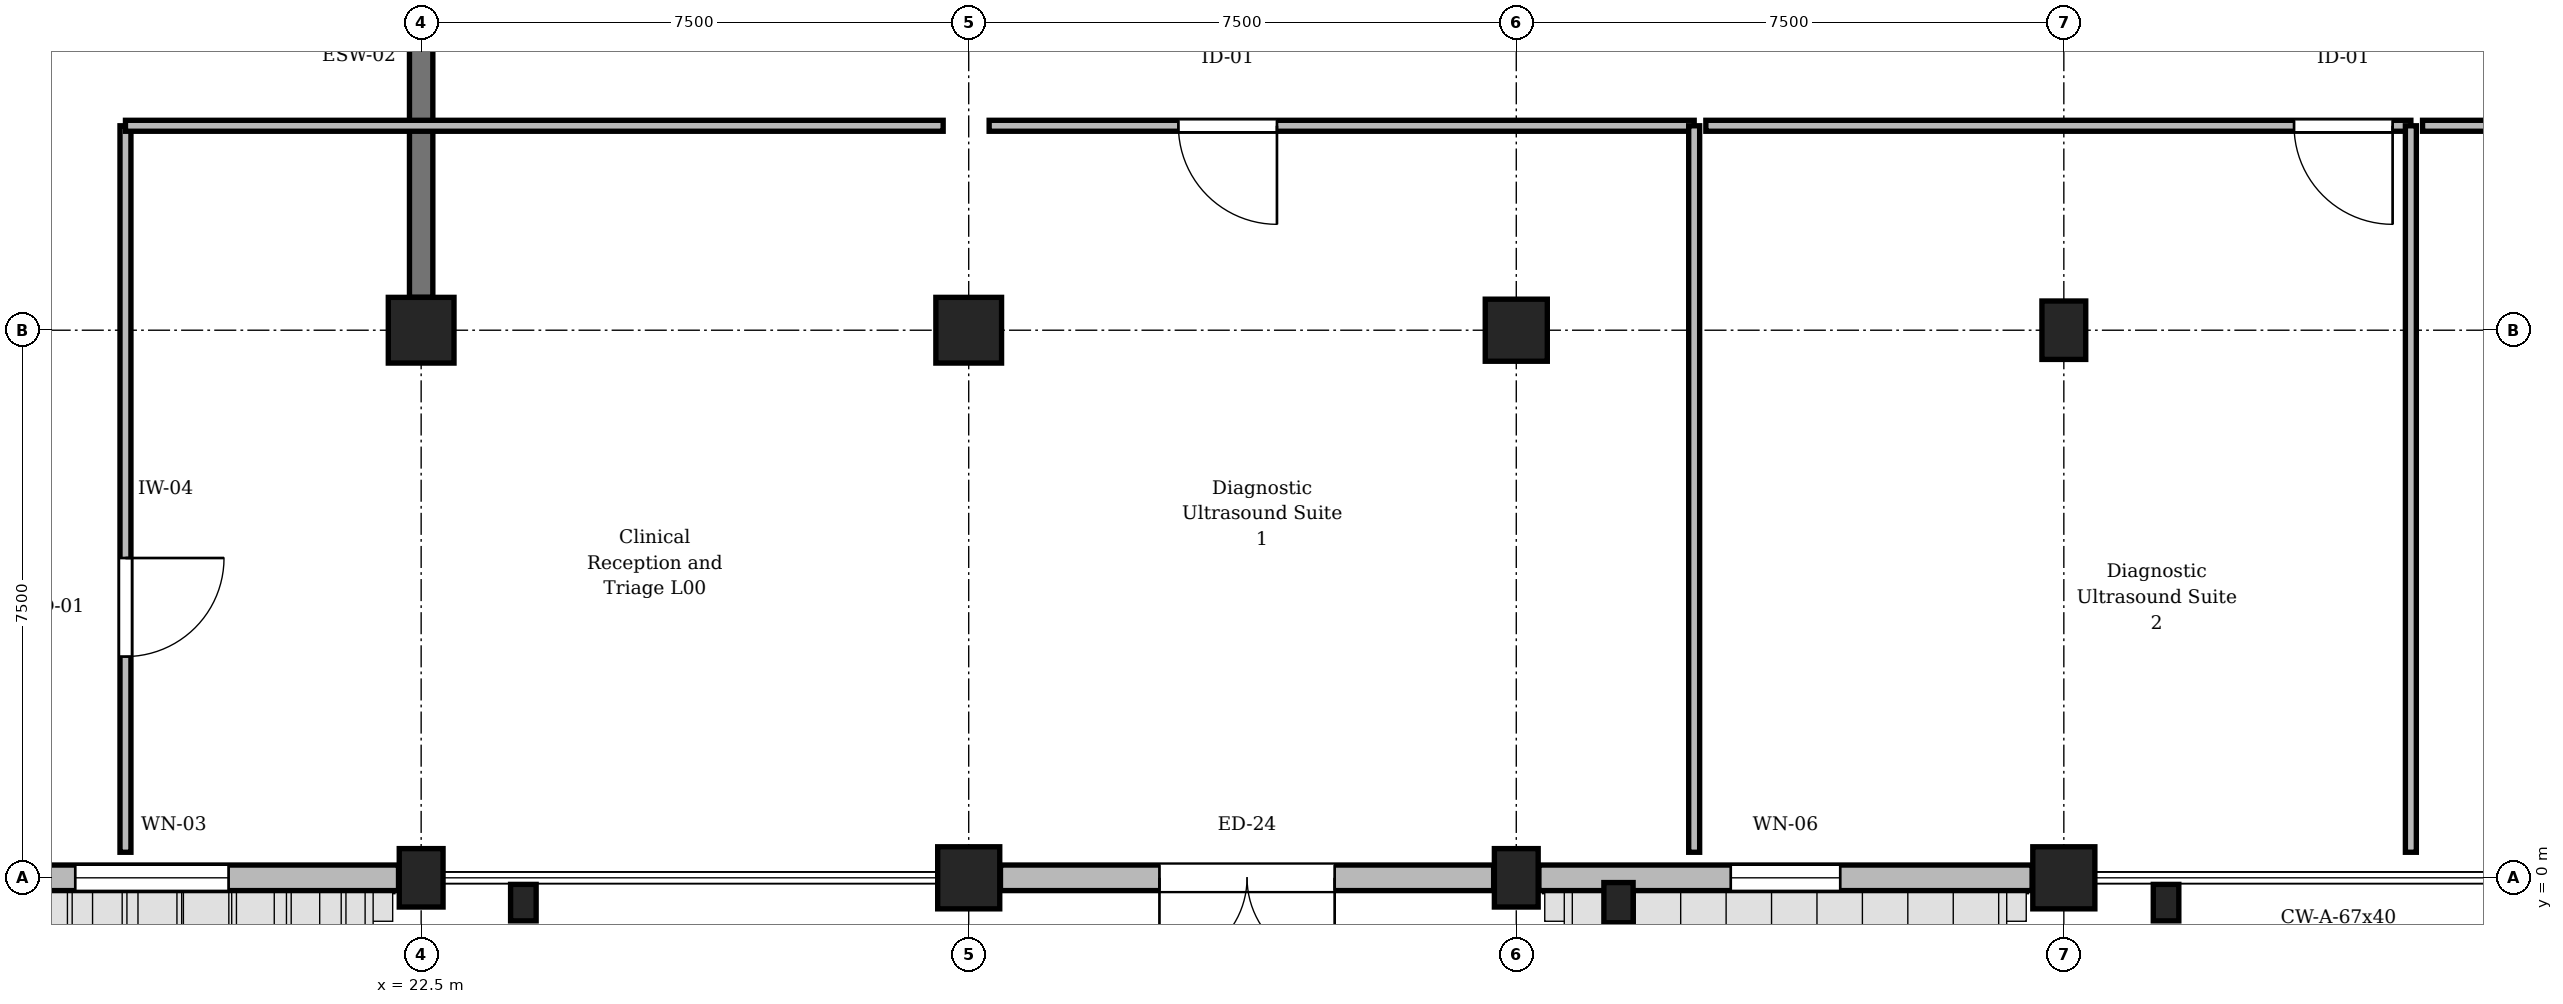
"""IFC4 building model, lengths in metres.
Left out: names, types, materials, properties, quantities, classifications, styles, units other than length and angle.
Written with IfcOpenShell. Run it as: python <this file> out.ifc"""

import sys

from ifc_helpers import new_model, si_unit, direction, frame, frame_2d, origin, origin_2d, place, context, subcontext, project, spatial, rectangle, extrude, element, fill, save


model = new_model("IFC4")
c1 = context("Model", 3, precision=1e-05, world=origin(), true_north=direction((0.0, 1.0)))
c2 = subcontext(c1, "Body", "Model", "MODEL_VIEW")
j1 = project(units=[si_unit("LENGTHUNIT", "METRE"), si_unit("PLANEANGLEUNIT", "RADIAN")], contexts=[c1])
p1 = place(None, origin())
s1 = spatial("IfcSite", under=j1, at=p1, CompositionType="ELEMENT")
p2 = place(p1, origin())
s2 = spatial("IfcBuilding", under=s1, at=p2, CompositionType="ELEMENT")
p3 = place(p2, origin())
s3 = spatial("IfcBuildingStorey", under=s2, at=p3, CompositionType="ELEMENT", Elevation=0.0)
p4 = place(p3, frame((22.5, 0.0, 0.0), z_axis=(0.0, 0.0, 1.0), x_axis=(1.0, 0.0, 0.0)))
e1 = element("IfcColumn", 1, at=p4, inside=s3, PredefinedType="COLUMN", context=c2, shape_type="SweptSolid", body=[
    extrude(rectangle(XDim=0.6, YDim=0.8, at=origin_2d()), origin(), (0.0, 0.0, 1.0), 4.8),
])
p5 = place(p3, frame((22.5, 7.5, 0.0), z_axis=(0.0, 0.0, 1.0), x_axis=(1.0, 0.0, 0.0)))
e2 = element("IfcColumn", 2, at=p5, inside=s3, PredefinedType="COLUMN", context=c2, shape_type="SweptSolid", body=[
    extrude(rectangle(XDim=0.9, YDim=0.9, at=origin_2d()), origin(), (0.0, 0.0, 1.0), 4.8),
])
p6 = place(p3, frame((30.0, 0.0, 0.0), z_axis=(0.0, 0.0, 1.0), x_axis=(1.0, 0.0, 0.0)))
e3 = element("IfcColumn", 3, at=p6, inside=s3, PredefinedType="COLUMN", context=c2, shape_type="SweptSolid", body=[
    extrude(rectangle(XDim=0.85, YDim=0.85, at=origin_2d()), origin(), (0.0, 0.0, 1.0), 4.8),
])
p7 = place(p3, frame((30.0, 7.5, 0.0), z_axis=(0.0, 0.0, 1.0), x_axis=(1.0, 0.0, 0.0)))
e4 = element("IfcColumn", 4, at=p7, inside=s3, PredefinedType="COLUMN", context=c2, shape_type="SweptSolid", body=[
    extrude(rectangle(XDim=0.9, YDim=0.9, at=origin_2d()), origin(), (0.0, 0.0, 1.0), 4.8),
])
p8 = place(p3, frame((37.5, 0.0, 0.0), z_axis=(0.0, 0.0, 1.0), x_axis=(1.0, 0.0, 0.0)))
e5 = element("IfcColumn", 5, at=p8, inside=s3, PredefinedType="COLUMN", context=c2, shape_type="SweptSolid", body=[
    extrude(rectangle(XDim=0.6, YDim=0.8, at=origin_2d()), origin(), (0.0, 0.0, 1.0), 4.8),
])
for number, where, z_axis, x_axis in (
    (6, (37.5, 7.5, 0.0), (0.0, 0.0, 1.0), (1.0, 0.0, 0.0)),
    (7, (45.0, 0.0, 0.0), (0.0, 0.0, 1.0), (1.0, 0.0, 0.0)),
):
    element("IfcColumn", number, at=place(p3, frame(where, z_axis=z_axis, x_axis=x_axis)), inside=s3, PredefinedType="COLUMN", context=c2, shape_type="SweptSolid", body=[
        extrude(rectangle(XDim=0.85, YDim=0.85, at=origin_2d()), origin(), (0.0, 0.0, 1.0), 4.8),
    ])
p9 = place(p3, frame((45.0, 7.5, 0.0), z_axis=(0.0, 0.0, 1.0), x_axis=(1.0, 0.0, 0.0)))
e8 = element("IfcColumn", 8, at=p9, inside=s3, PredefinedType="COLUMN", context=c2, shape_type="SweptSolid", body=[
    extrude(rectangle(XDim=0.6, YDim=0.8, at=origin_2d()), origin(), (0.0, 0.0, 1.0), 4.8),
])
p10 = place(p3, frame((23.9, -0.34, 0.0), z_axis=(0.0, 0.0, 1.0), x_axis=(1.0, 0.0, 0.0)))
e9 = element("IfcColumn", 9, at=p10, inside=s3, PredefinedType="PILASTER", context=c2, shape_type="SweptSolid", body=[
    extrude(rectangle(XDim=0.35, YDim=0.5, at=origin_2d()), origin(), (0.0, 0.0, 1.0), 4.1),
])
p11 = place(p3, frame((38.9, -0.34, 0.0), z_axis=(0.0, 0.0, 1.0), x_axis=(1.0, 0.0, 0.0)))
e10 = element("IfcColumn", 10, at=p11, inside=s3, PredefinedType="PILASTER", context=c2, shape_type="SweptSolid", body=[
    extrude(rectangle(XDim=0.4, YDim=0.55, at=origin_2d()), origin(), (0.0, 0.0, 1.0), 4.1),
])
p12 = place(p3, frame((46.4, -0.34, 0.0), z_axis=(0.0, 0.0, 1.0), x_axis=(1.0, 0.0, 0.0)))
e11 = element("IfcColumn", 11, at=p12, inside=s3, PredefinedType="PILASTER", context=c2, shape_type="SweptSolid", body=[
    extrude(rectangle(XDim=0.35, YDim=0.5, at=origin_2d()), origin(), (0.0, 0.0, 1.0), 4.1),
])
p13 = place(p3, frame((22.5, 7.95, 0.0), z_axis=(0.0, 0.0, 1.0), x_axis=(0.0, 1.0, 0.0)))
e12 = element("IfcWall", 12, at=p13, inside=s3, PredefinedType="SHEAR", context=c2, shape_type="SweptSolid", body=[
    extrude(rectangle(XDim=6.6, YDim=0.32, at=frame_2d((3.3, 0.0))), origin(), (0.0, 0.0, 1.0), 3.95),
])
p14 = place(p3, frame((22.19, 0.0, 0.0), z_axis=(0.0, 0.0, 1.0), x_axis=(-1.0, 0.0, 0.0)))
e13 = element("IfcWall", 13, at=p14, inside=s3, PredefinedType="STANDARD", context=c2, shape_type="SweptSolid", body=[
    extrude(rectangle(XDim=6.755, YDim=0.35, at=frame_2d((3.377, 0.0))), origin(), (0.0, 0.0, 1.0), 3.95),
])
p15 = place(p14, frame((2.327, 0.0, 0.9)))
e14 = element("IfcOpeningElement", 14, at=p15, cuts=e13, PredefinedType="OPENING", context=c2, shape_type="SweptSolid", body=[
    extrude(rectangle(XDim=2.1, YDim=2.4, at=frame_2d((1.05, 1.2))), frame((0.0, 0.185, 0.0), z_axis=(0.0, -1.0, 0.0), x_axis=(1.0, 0.0, 0.0)), (0.0, 0.0, 1.0), 0.37),
])
p16 = place(p3, frame((37.19, 0.0, 0.0), z_axis=(0.0, 0.0, 1.0), x_axis=(-1.0, 0.0, 0.0)))
e15 = element("IfcWall", 15, at=p16, inside=s3, PredefinedType="STANDARD", context=c2, shape_type="SweptSolid", body=[
    extrude(rectangle(XDim=6.755, YDim=0.35, at=frame_2d((3.377, 0.0))), origin(), (0.0, 0.0, 1.0), 3.95),
])
p17 = place(p16, frame((2.177, 0.0, 0.0)))
e16 = element("IfcOpeningElement", 16, at=p17, cuts=e15, PredefinedType="OPENING", context=c2, shape_type="SweptSolid", body=[
    extrude(rectangle(XDim=2.4, YDim=2.7, at=frame_2d((1.2, 1.35))), frame((0.0, 0.185, 0.0), z_axis=(0.0, -1.0, 0.0), x_axis=(1.0, 0.0, 0.0)), (0.0, 0.0, 1.0), 0.37),
])
p18 = place(p3, frame((44.565, 0.0, 0.0), z_axis=(0.0, 0.0, 1.0), x_axis=(-1.0, 0.0, 0.0)))
e17 = element("IfcWall", 17, at=p18, inside=s3, PredefinedType="STANDARD", context=c2, shape_type="SweptSolid", body=[
    extrude(rectangle(XDim=6.755, YDim=0.35, at=frame_2d((3.377, 0.0))), origin(), (0.0, 0.0, 1.0), 3.95),
])
p19 = place(p18, frame((2.627, 0.0, 0.9)))
e18 = element("IfcOpeningElement", 18, at=p19, cuts=e17, PredefinedType="OPENING", context=c2, shape_type="SweptSolid", body=[
    extrude(rectangle(XDim=1.5, YDim=2.1, at=frame_2d((0.75, 1.05))), frame((0.0, 0.185, 0.0), z_axis=(0.0, -1.0, 0.0), x_axis=(1.0, 0.0, 0.0)), (0.0, 0.0, 1.0), 0.37),
])
p20 = place(p3, frame((18.45, 10.3, 0.0), z_axis=(0.0, 0.0, 1.0), x_axis=(0.0, -1.0, 0.0)))
e19 = element("IfcWall", 19, at=p20, inside=s3, PredefinedType="PARTITIONING", context=c2, shape_type="SweptSolid", body=[
    extrude(rectangle(XDim=9.95, YDim=0.15, at=frame_2d((4.975, 0.0))), origin(), (0.0, 0.0, 1.0), 4.485),
])
p21 = place(p20, frame((5.92, 0.0, 0.0)))
e20 = element("IfcOpeningElement", 20, at=p21, cuts=e19, PredefinedType="OPENING", context=c2, shape_type="SweptSolid", body=[
    extrude(rectangle(XDim=1.35, YDim=2.25, at=frame_2d((0.675, 1.125))), frame((0.0, 0.085, 0.0), z_axis=(0.0, -1.0, 0.0), x_axis=(1.0, 0.0, 0.0)), (0.0, 0.0, 1.0), 0.17),
])
p22 = place(p3, frame((39.937, 10.3, 0.0), z_axis=(0.0, 0.0, 1.0), x_axis=(-1.0, 0.0, 0.0)))
e21 = element("IfcWall", 21, at=p22, inside=s3, PredefinedType="PARTITIONING", context=c2, shape_type="SweptSolid", body=[
    extrude(rectangle(XDim=9.657, YDim=0.15, at=frame_2d((4.828, 0.0))), origin(), (0.0, 0.0, 1.0), 4.485),
])
p23 = place(p22, frame((5.715, 0.0, 0.0)))
e22 = element("IfcOpeningElement", 22, at=p23, cuts=e21, PredefinedType="OPENING", context=c2, shape_type="SweptSolid", body=[
    extrude(rectangle(XDim=1.35, YDim=2.25, at=frame_2d((0.675, 1.125))), frame((0.0, 0.085, 0.0), z_axis=(0.0, -1.0, 0.0), x_axis=(1.0, 0.0, 0.0)), (0.0, 0.0, 1.0), 0.17),
])
p24 = place(p3, frame((49.753, 10.3, 0.0), z_axis=(0.0, 0.0, 1.0), x_axis=(-1.0, 0.0, 0.0)))
e23 = element("IfcWall", 23, at=p24, inside=s3, PredefinedType="PARTITIONING", context=c2, shape_type="SweptSolid", body=[
    extrude(rectangle(XDim=9.657, YDim=0.15, at=frame_2d((4.828, 0.0))), origin(), (0.0, 0.0, 1.0), 4.485),
])
p25 = place(p24, frame((0.25, 0.0, 0.0)))
e24 = element("IfcOpeningElement", 24, at=p25, cuts=e23, PredefinedType="OPENING", context=c2, shape_type="SweptSolid", body=[
    extrude(rectangle(XDim=1.35, YDim=2.25, at=frame_2d((0.675, 1.125))), frame((0.0, 0.085, 0.0), z_axis=(0.0, -1.0, 0.0), x_axis=(1.0, 0.0, 0.0)), (0.0, 0.0, 1.0), 0.17),
])
p26 = place(p3, frame((59.57, 10.3, 0.0), z_axis=(0.0, 0.0, 1.0), x_axis=(-1.0, 0.0, 0.0)))
e25 = element("IfcWall", 25, at=p26, inside=s3, PredefinedType="PARTITIONING", context=c2, shape_type="SweptSolid", body=[
    extrude(rectangle(XDim=9.657, YDim=0.15, at=frame_2d((4.828, 0.0))), origin(), (0.0, 0.0, 1.0), 4.485),
])
p27 = place(p26, frame((2.592, 0.0, 0.0)))
e26 = element("IfcOpeningElement", 26, at=p27, cuts=e25, PredefinedType="OPENING", context=c2, shape_type="SweptSolid", body=[
    extrude(rectangle(XDim=1.35, YDim=2.25, at=frame_2d((0.675, 1.125))), frame((0.0, 0.085, 0.0), z_axis=(0.0, -1.0, 0.0), x_axis=(1.0, 0.0, 0.0)), (0.0, 0.0, 1.0), 0.17),
])
p28 = place(p3, frame((18.45, 10.3, 0.0), z_axis=(0.0, 0.0, 1.0), x_axis=(1.0, 0.0, 0.0)))
e27 = element("IfcWall", 27, at=p28, inside=s3, PredefinedType="PARTITIONING", context=c2, shape_type="SweptSolid", body=[
    extrude(rectangle(XDim=11.2, YDim=0.15, at=frame_2d((5.6, 0.0))), origin(), (0.0, 0.0, 1.0), 4.485),
])
for number, where, z_axis, x_axis in (
    (28, (39.937, 0.35, 0.0), (0.0, 0.0, 1.0), (0.0, 1.0, 0.0)),
    (29, (49.753, 0.35, 0.0), (0.0, 0.0, 1.0), (0.0, 1.0, 0.0)),
):
    element("IfcWall", number, at=place(p3, frame(where, z_axis=z_axis, x_axis=x_axis)), inside=s3, PredefinedType="PARTITIONING", context=c2, shape_type="SweptSolid", body=[
        extrude(rectangle(XDim=9.95, YDim=0.15, at=frame_2d((4.975, 0.0))), origin(), (0.0, 0.0, 1.0), 4.485),
    ])
p29 = place(p15, origin())
e30 = element("IfcWindow", 30, at=p29, inside=s3, PartitioningType="SINGLE_PANEL", PredefinedType="WINDOW", context=c2, shape_type="SweptSolid", body=[
    extrude(rectangle(XDim=2.1, YDim=2.4, at=frame_2d((1.05, 1.2))), frame((0.0, 0.03, 0.0), z_axis=(0.0, -1.0, 0.0), x_axis=(1.0, 0.0, 0.0)), (0.0, 0.0, 1.0), 0.06),
])
fill(e14, e30)
p30 = place(p17, origin())
e31 = element("IfcDoor", 31, at=p30, inside=s3, OperationType="DOUBLE_DOOR_SINGLE_SWING", PredefinedType="DOOR", context=c2, shape_type="SweptSolid", body=[
    extrude(rectangle(XDim=2.4, YDim=2.7, at=frame_2d((1.2, 1.35))), frame((0.0, 0.025, 0.0), z_axis=(0.0, -1.0, 0.0), x_axis=(1.0, 0.0, 0.0)), (0.0, 0.0, 1.0), 0.05),
])
fill(e16, e31)
p31 = place(p19, origin())
e32 = element("IfcWindow", 32, at=p31, inside=s3, PartitioningType="SINGLE_PANEL", PredefinedType="WINDOW", context=c2, shape_type="SweptSolid", body=[
    extrude(rectangle(XDim=1.5, YDim=2.1, at=frame_2d((0.75, 1.05))), frame((0.0, 0.03, 0.0), z_axis=(0.0, -1.0, 0.0), x_axis=(1.0, 0.0, 0.0)), (0.0, 0.0, 1.0), 0.06),
])
fill(e18, e32)
p32 = place(p21, origin())
e33 = element("IfcDoor", 33, at=p32, inside=s3, OperationType="SINGLE_SWING_LEFT", PredefinedType="DOOR", context=c2, shape_type="SweptSolid", body=[
    extrude(rectangle(XDim=1.35, YDim=2.25, at=frame_2d((0.675, 1.125))), frame((0.0, 0.025, 0.0), z_axis=(0.0, -1.0, 0.0), x_axis=(1.0, 0.0, 0.0)), (0.0, 0.0, 1.0), 0.05),
])
fill(e20, e33)
p33 = place(p23, origin())
e34 = element("IfcDoor", 34, at=p33, inside=s3, OperationType="SINGLE_SWING_LEFT", PredefinedType="DOOR", context=c2, shape_type="SweptSolid", body=[
    extrude(rectangle(XDim=1.35, YDim=2.25, at=frame_2d((0.675, 1.125))), frame((0.0, 0.025, 0.0), z_axis=(0.0, -1.0, 0.0), x_axis=(1.0, 0.0, 0.0)), (0.0, 0.0, 1.0), 0.05),
])
fill(e22, e34)
p34 = place(p25, origin())
e35 = element("IfcDoor", 35, at=p34, inside=s3, OperationType="SINGLE_SWING_LEFT", PredefinedType="DOOR", context=c2, shape_type="SweptSolid", body=[
    extrude(rectangle(XDim=1.35, YDim=2.25, at=frame_2d((0.675, 1.125))), frame((0.0, 0.025, 0.0), z_axis=(0.0, -1.0, 0.0), x_axis=(1.0, 0.0, 0.0)), (0.0, 0.0, 1.0), 0.05),
])
fill(e24, e35)
save(model, sys.argv[1])
